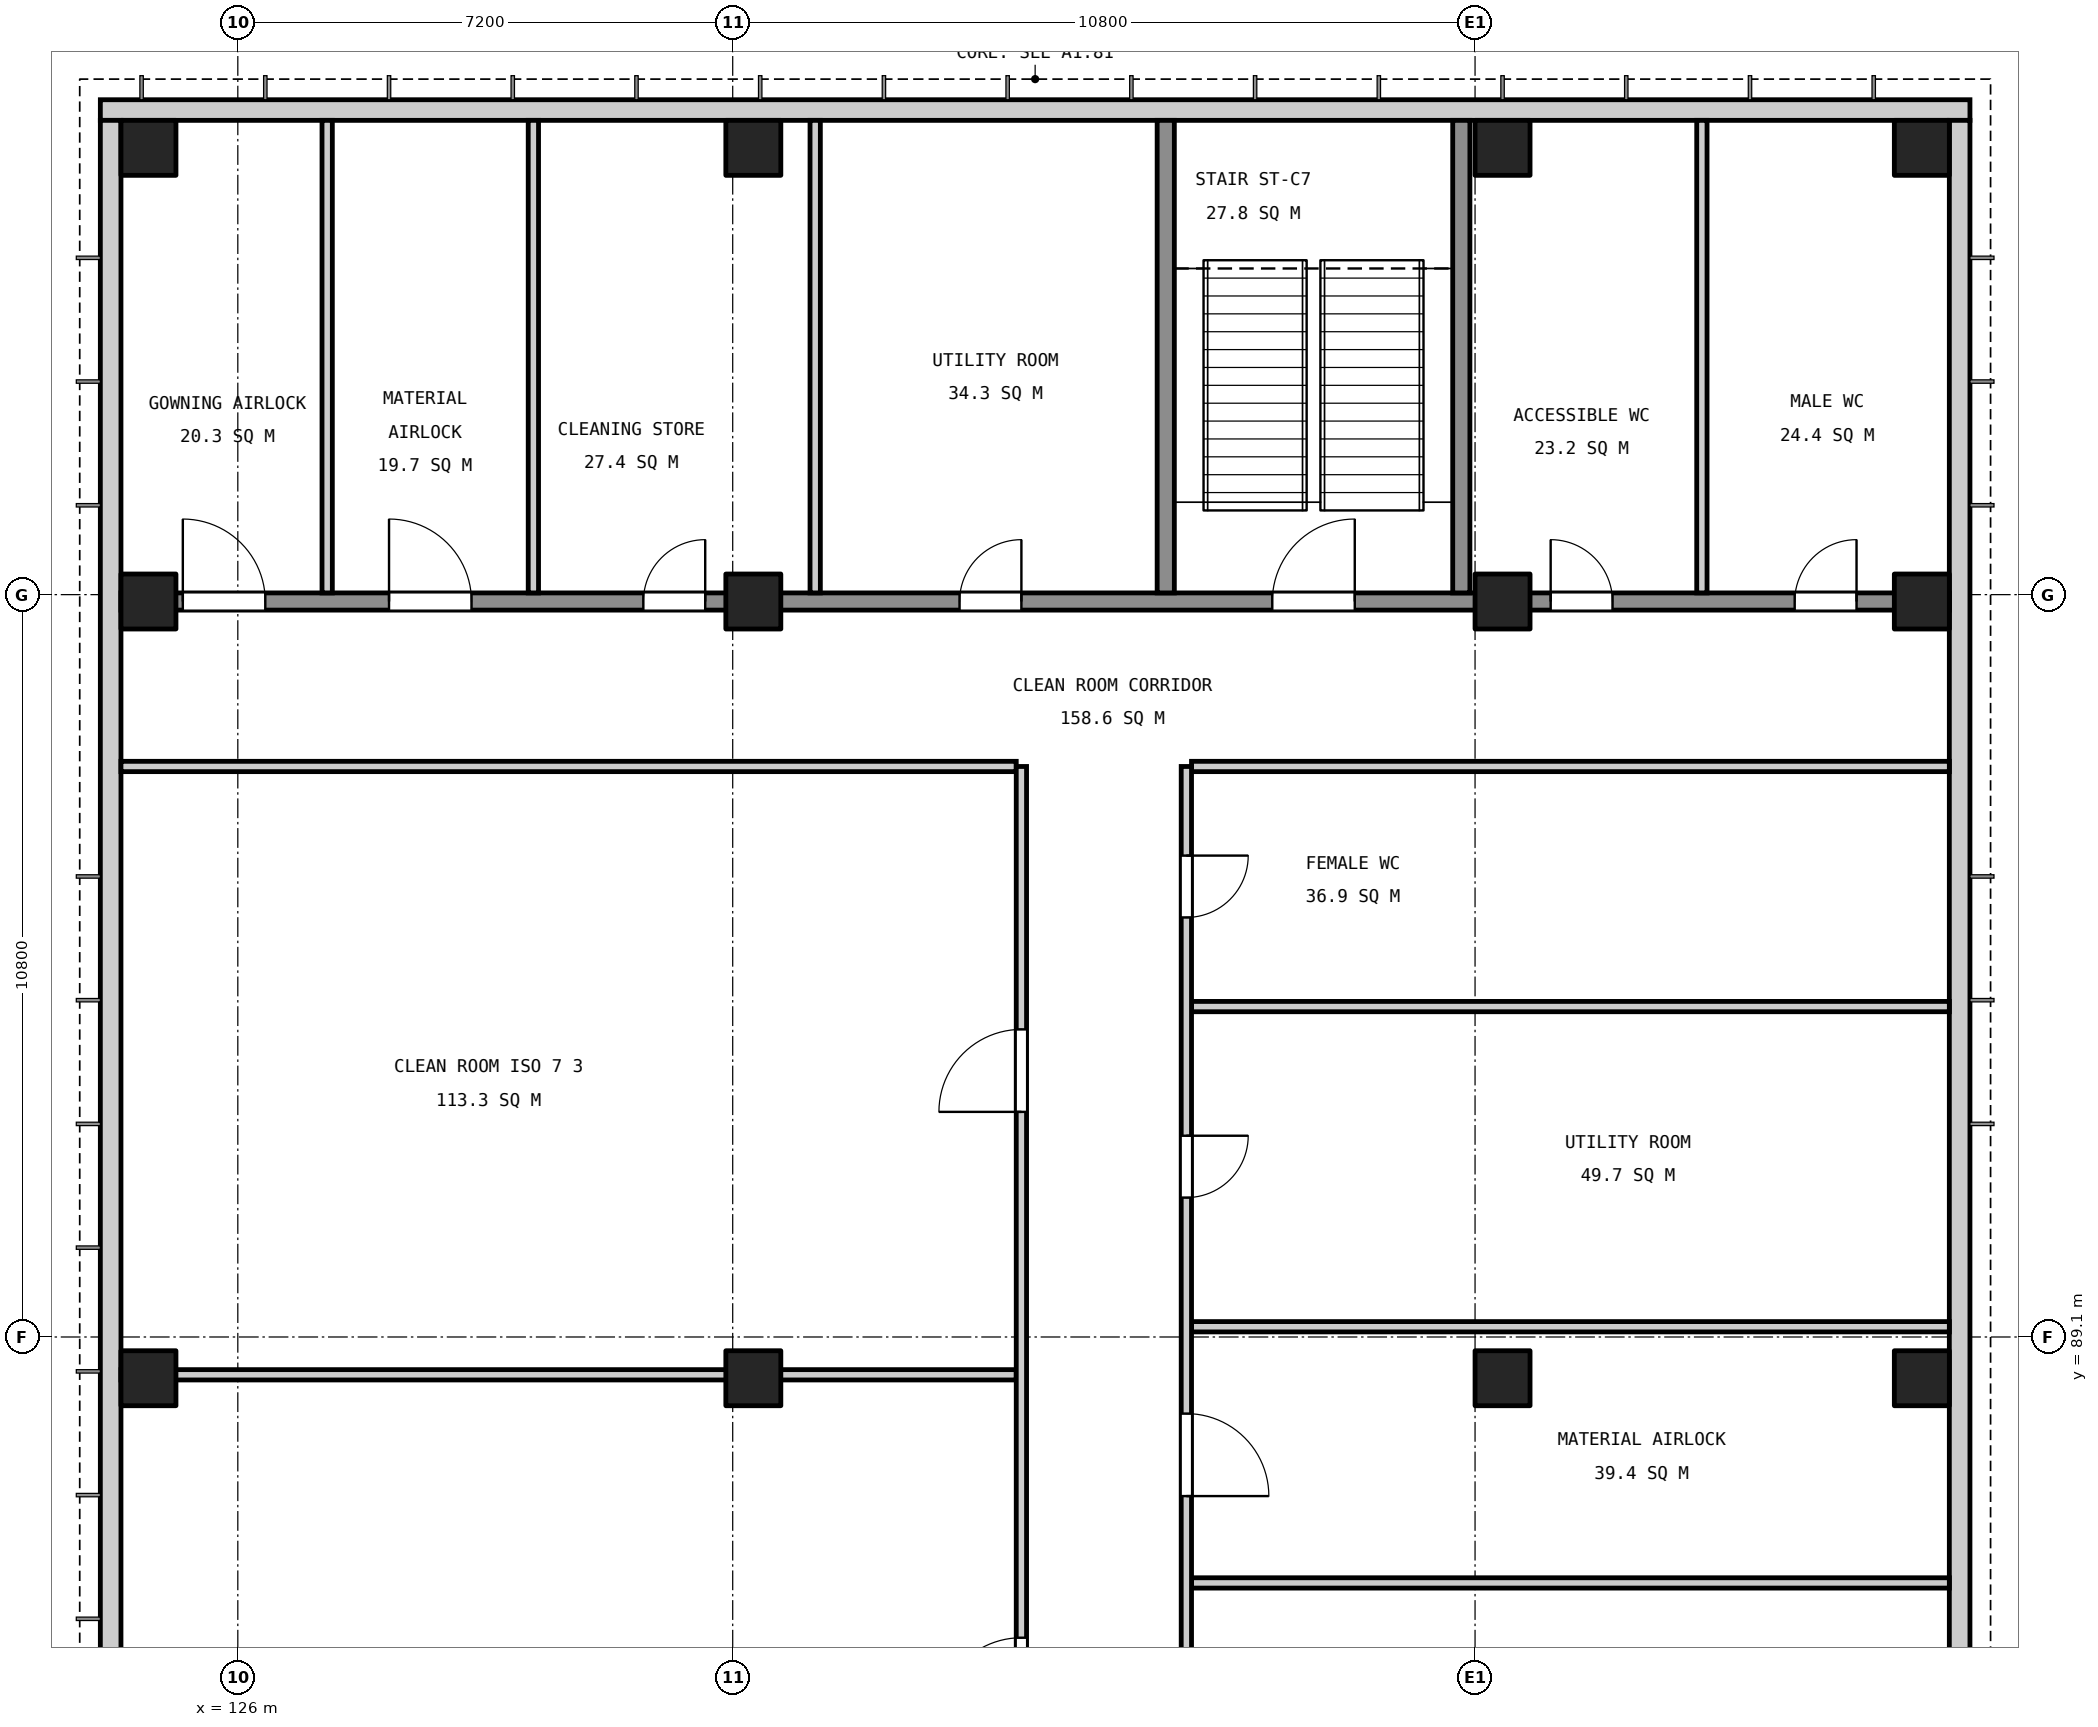
"""IFC4 building model, lengths in metres.
Left out: names, types, materials, properties, quantities, classifications, styles, units other than length and angle.
Written with IfcOpenShell. Run it as: python <this file> out.ifc"""

import sys

from ifc_helpers import new_model, si_unit, direction, frame, frame_2d, origin, origin_2d, place, context, subcontext, project, spatial, rectangle, extrude, element, fill, save


model = new_model("IFC4")
c1 = context("Model", 3, precision=1e-05, world=origin(), true_north=direction((0.0, 1.0)))
c2 = subcontext(c1, "Body", "Model", "MODEL_VIEW")
j1 = project(units=[si_unit("LENGTHUNIT", "METRE"), si_unit("PLANEANGLEUNIT", "RADIAN")], contexts=[c1])
p1 = place(None, origin())
s1 = spatial("IfcSite", under=j1, at=p1, CompositionType="ELEMENT")
p2 = place(p1, origin())
s2 = spatial("IfcBuilding", under=s1, at=p2, CompositionType="ELEMENT")
p3 = place(p2, frame((0.0, 0.0, 11.4)))
s3 = spatial("IfcBuildingStorey", under=s2, at=p3, CompositionType="ELEMENT", Elevation=11.4)
for number, where, z_axis, x_axis in (
    (1, (124.7, 88.5, 0.0), (0.0, 0.0, 1.0), (1.0, 0.0, 0.0)),
    (2, (124.7, 99.8, 0.0), (0.0, 0.0, 1.0), (1.0, 0.0, 0.0)),
    (3, (124.7, 106.4, 0.0), (0.0, 0.0, 1.0), (1.0, 0.0, 0.0)),
    (4, (133.5, 88.5, 0.0), (0.0, 0.0, 1.0), (1.0, 0.0, 0.0)),
    (5, (133.5, 99.8, 0.0), (0.0, 0.0, 1.0), (1.0, 0.0, 0.0)),
    (6, (133.5, 106.4, 0.0), (0.0, 0.0, 1.0), (1.0, 0.0, 0.0)),
    (7, (144.4, 88.5, 0.0), (0.0, 0.0, 1.0), (1.0, 0.0, 0.0)),
    (8, (144.4, 99.8, 0.0), (0.0, 0.0, 1.0), (1.0, 0.0, 0.0)),
    (9, (144.4, 106.4, 0.0), (0.0, 0.0, 1.0), (1.0, 0.0, 0.0)),
    (10, (150.5, 88.5, 0.0), (0.0, 0.0, 1.0), (1.0, 0.0, 0.0)),
    (11, (150.5, 99.8, 0.0), (0.0, 0.0, 1.0), (1.0, 0.0, 0.0)),
    (12, (150.5, 106.4, 0.0), (0.0, 0.0, 1.0), (1.0, 0.0, 0.0)),
):
    element("IfcColumn", number, at=place(p3, frame(where, z_axis=z_axis, x_axis=x_axis)), inside=s3, PredefinedType="COLUMN", context=c2, shape_type="SweptSolid", body=[
        extrude(rectangle(XDim=0.8, YDim=0.8, at=origin_2d()), origin(), (0.0, 0.0, 1.0), 5.4),
    ])
p4 = place(p3, frame((124.0, 106.95, 0.0), z_axis=(0.0, 0.0, 1.0), x_axis=(1.0, 0.0, 0.0)))
e13 = element("IfcWall", 13, at=p4, inside=s3, PredefinedType="SOLIDWALL", context=c2, shape_type="SweptSolid", body=[
    extrude(rectangle(XDim=27.2, YDim=0.3, at=frame_2d((13.6, 0.0))), origin(), (0.0, 0.0, 1.0), 4.95),
])
for number, where, z_axis, x_axis in (
    (14, (124.15, 70.3, 0.0), (0.0, 0.0, 1.0), (0.0, 1.0, 0.0)),
    (15, (151.05, 70.3, 0.0), (0.0, 0.0, 1.0), (0.0, 1.0, 0.0)),
):
    element("IfcWall", number, at=place(p3, frame(where, z_axis=z_axis, x_axis=x_axis)), inside=s3, PredefinedType="SOLIDWALL", context=c2, shape_type="SweptSolid", body=[
        extrude(rectangle(XDim=36.5, YDim=0.3, at=frame_2d((18.25, 0.0))), origin(), (0.0, 0.0, 1.0), 4.95),
    ])
p5 = place(p3, frame((139.875, 85.522, 0.0), z_axis=(0.0, 0.0, 1.0), x_axis=(1.0, 0.0, 0.0)))
e16 = element("IfcWall", 16, at=p5, inside=s3, PredefinedType="SOLIDWALL", context=c2, shape_type="SweptSolid", body=[
    extrude(rectangle(XDim=11.025, YDim=0.15, at=frame_2d((5.512, 0.0))), origin(), (0.0, 0.0, 1.0), 4.95),
])
p6 = place(p3, frame((124.3, 88.55, 0.0), z_axis=(0.0, 0.0, 1.0), x_axis=(1.0, 0.0, 0.0)))
e17 = element("IfcWall", 17, at=p6, inside=s3, PredefinedType="SOLIDWALL", context=c2, shape_type="SweptSolid", body=[
    extrude(rectangle(XDim=13.025, YDim=0.15, at=frame_2d((6.512, 0.0))), origin(), (0.0, 0.0, 1.0), 4.95),
])
for number, where, z_axis, x_axis in (
    (18, (139.875, 89.249, 0.0), (0.0, 0.0, 1.0), (1.0, 0.0, 0.0)),
    (19, (139.875, 93.907, 0.0), (0.0, 0.0, 1.0), (1.0, 0.0, 0.0)),
):
    element("IfcWall", number, at=place(p3, frame(where, z_axis=z_axis, x_axis=x_axis)), inside=s3, PredefinedType="SOLIDWALL", context=c2, shape_type="SweptSolid", body=[
        extrude(rectangle(XDim=11.025, YDim=0.15, at=frame_2d((5.512, 0.0))), origin(), (0.0, 0.0, 1.0), 4.95),
    ])
p7 = place(p3, frame((124.3, 97.4, 0.0), z_axis=(0.0, 0.0, 1.0), x_axis=(1.0, 0.0, 0.0)))
e20 = element("IfcWall", 20, at=p7, inside=s3, PredefinedType="SOLIDWALL", context=c2, shape_type="SweptSolid", body=[
    extrude(rectangle(XDim=13.025, YDim=0.15, at=frame_2d((6.512, 0.0))), origin(), (0.0, 0.0, 1.0), 4.95),
])
p8 = place(p3, frame((139.875, 97.4, 0.0), z_axis=(0.0, 0.0, 1.0), x_axis=(1.0, 0.0, 0.0)))
e21 = element("IfcWall", 21, at=p8, inside=s3, PredefinedType="SOLIDWALL", context=c2, shape_type="SweptSolid", body=[
    extrude(rectangle(XDim=11.025, YDim=0.15, at=frame_2d((5.512, 0.0))), origin(), (0.0, 0.0, 1.0), 4.95),
])
p9 = place(p3, frame((124.3, 99.8, 0.0), z_axis=(0.0, 0.0, 1.0), x_axis=(1.0, 0.0, 0.0)))
e22 = element("IfcWall", 22, at=p9, inside=s3, PredefinedType="SOLIDWALL", context=c2, shape_type="SweptSolid", body=[
    extrude(rectangle(XDim=26.6, YDim=0.25, at=frame_2d((13.3, 0.0))), origin(), (0.0, 0.0, 1.0), 4.95),
])
p10 = place(p9, frame((0.9, 0.0, 0.0)))
e23 = element("IfcOpeningElement", 23, at=p10, cuts=e22, PredefinedType="OPENING", context=c2, shape_type="SweptSolid", body=[
    extrude(rectangle(XDim=1.2, YDim=2.1, at=frame_2d((0.6, 1.05))), frame((0.0, 0.135, 0.0), z_axis=(0.0, -1.0, 0.0), x_axis=(1.0, 0.0, 0.0)), (0.0, 0.0, 1.0), 0.27),
])
p11 = place(p9, frame((3.9, 0.0, 0.0)))
e24 = element("IfcOpeningElement", 24, at=p11, cuts=e22, PredefinedType="OPENING", context=c2, shape_type="SweptSolid", body=[
    extrude(rectangle(XDim=1.2, YDim=2.1, at=frame_2d((0.6, 1.05))), frame((0.0, 0.135, 0.0), z_axis=(0.0, -1.0, 0.0), x_axis=(1.0, 0.0, 0.0)), (0.0, 0.0, 1.0), 0.27),
])
p12 = place(p9, frame((7.6, 0.0, 0.0)))
e25 = element("IfcOpeningElement", 25, at=p12, cuts=e22, PredefinedType="OPENING", context=c2, shape_type="SweptSolid", body=[
    extrude(rectangle(XDim=0.9, YDim=2.1, at=frame_2d((0.45, 1.05))), frame((0.0, 0.135, 0.0), z_axis=(0.0, -1.0, 0.0), x_axis=(1.0, 0.0, 0.0)), (0.0, 0.0, 1.0), 0.27),
])
p13 = place(p9, frame((20.8, 0.0, 0.0)))
e26 = element("IfcOpeningElement", 26, at=p13, cuts=e22, PredefinedType="OPENING", context=c2, shape_type="SweptSolid", body=[
    extrude(rectangle(XDim=0.9, YDim=2.1, at=frame_2d((0.45, 1.05))), frame((0.0, 0.135, 0.0), z_axis=(0.0, -1.0, 0.0), x_axis=(1.0, 0.0, 0.0)), (0.0, 0.0, 1.0), 0.27),
])
p14 = place(p9, frame((24.35, 0.0, 0.0)))
e27 = element("IfcOpeningElement", 27, at=p14, cuts=e22, PredefinedType="OPENING", context=c2, shape_type="SweptSolid", body=[
    extrude(rectangle(XDim=0.9, YDim=2.1, at=frame_2d((0.45, 1.05))), frame((0.0, 0.135, 0.0), z_axis=(0.0, -1.0, 0.0), x_axis=(1.0, 0.0, 0.0)), (0.0, 0.0, 1.0), 0.27),
])
p15 = place(p9, frame((12.2, 0.0, 0.0)))
e28 = element("IfcOpeningElement", 28, at=p15, cuts=e22, PredefinedType="OPENING", context=c2, shape_type="SweptSolid", body=[
    extrude(rectangle(XDim=0.9, YDim=2.1, at=frame_2d((0.45, 1.05))), frame((0.0, 0.135, 0.0), z_axis=(0.0, -1.0, 0.0), x_axis=(1.0, 0.0, 0.0)), (0.0, 0.0, 1.0), 0.27),
])
p16 = place(p9, frame((16.75, 0.0, 0.0)))
e29 = element("IfcOpeningElement", 29, at=p16, cuts=e22, PredefinedType="OPENING", context=c2, shape_type="SweptSolid", body=[
    extrude(rectangle(XDim=1.2, YDim=2.1, at=frame_2d((0.6, 1.05))), frame((0.0, 0.135, 0.0), z_axis=(0.0, -1.0, 0.0), x_axis=(1.0, 0.0, 0.0)), (0.0, 0.0, 1.0), 0.27),
])
for number, where, z_axis, x_axis in (
    (30, (127.3, 99.925, 0.0), (0.0, 0.0, 1.0), (0.0, 1.0, 0.0)),
    (31, (130.3, 99.925, 0.0), (0.0, 0.0, 1.0), (0.0, 1.0, 0.0)),
    (32, (134.4, 99.925, 0.0), (0.0, 0.0, 1.0), (0.0, 1.0, 0.0)),
):
    element("IfcWall", number, at=place(p3, frame(where, z_axis=z_axis, x_axis=x_axis)), inside=s3, PredefinedType="SOLIDWALL", context=c2, shape_type="SweptSolid", body=[
        extrude(rectangle(XDim=6.875, YDim=0.15, at=frame_2d((3.438, 0.0))), origin(), (0.0, 0.0, 1.0), 4.95),
    ])
p17 = place(p3, frame((137.4, 79.7, 0.0), z_axis=(0.0, 0.0, 1.0), x_axis=(0.0, 1.0, 0.0)))
e33 = element("IfcWall", 33, at=p17, inside=s3, PredefinedType="SOLIDWALL", context=c2, shape_type="SweptSolid", body=[
    extrude(rectangle(XDim=17.7, YDim=0.15, at=frame_2d((8.85, 0.0))), origin(), (0.0, 0.0, 1.0), 4.95),
])
p18 = place(p17, frame((3.825, 0.0, 0.0)))
e34 = element("IfcOpeningElement", 34, at=p18, cuts=e33, PredefinedType="OPENING", context=c2, shape_type="SweptSolid", body=[
    extrude(rectangle(XDim=1.2, YDim=2.1, at=frame_2d((0.6, 1.05))), frame((0.0, 0.085, 0.0), z_axis=(0.0, -1.0, 0.0), x_axis=(1.0, 0.0, 0.0)), (0.0, 0.0, 1.0), 0.17),
])
p19 = place(p17, frame((12.675, 0.0, 0.0)))
e35 = element("IfcOpeningElement", 35, at=p19, cuts=e33, PredefinedType="OPENING", context=c2, shape_type="SweptSolid", body=[
    extrude(rectangle(XDim=1.2, YDim=2.1, at=frame_2d((0.6, 1.05))), frame((0.0, 0.085, 0.0), z_axis=(0.0, -1.0, 0.0), x_axis=(1.0, 0.0, 0.0)), (0.0, 0.0, 1.0), 0.17),
])
p20 = place(p3, frame((139.5, 99.925, 0.0), z_axis=(0.0, 0.0, 1.0), x_axis=(0.0, 1.0, 0.0)))
e36 = element("IfcWall", 36, at=p20, inside=s3, PredefinedType="SOLIDWALL", context=c2, shape_type="SweptSolid", body=[
    extrude(rectangle(XDim=6.875, YDim=0.25, at=frame_2d((3.438, 0.0))), origin(), (0.0, 0.0, 1.0), 4.95),
])
p21 = place(p3, frame((139.8, 79.7, 0.0), z_axis=(0.0, 0.0, 1.0), x_axis=(0.0, 1.0, 0.0)))
e37 = element("IfcWall", 37, at=p21, inside=s3, PredefinedType="SOLIDWALL", context=c2, shape_type="SweptSolid", body=[
    extrude(rectangle(XDim=17.7, YDim=0.15, at=frame_2d((8.85, 0.0))), origin(), (0.0, 0.0, 1.0), 4.95),
])
p22 = place(p21, frame((2.311, 0.0, 0.0)))
e38 = element("IfcOpeningElement", 38, at=p22, cuts=e37, PredefinedType="OPENING", context=c2, shape_type="SweptSolid", body=[
    extrude(rectangle(XDim=1.2, YDim=2.1, at=frame_2d((0.6, 1.05))), frame((0.0, 0.085, 0.0), z_axis=(0.0, -1.0, 0.0), x_axis=(1.0, 0.0, 0.0)), (0.0, 0.0, 1.0), 0.17),
])
p23 = place(p21, frame((7.085, 0.0, 0.0)))
e39 = element("IfcOpeningElement", 39, at=p23, cuts=e37, PredefinedType="OPENING", context=c2, shape_type="SweptSolid", body=[
    extrude(rectangle(XDim=1.2, YDim=2.1, at=frame_2d((0.6, 1.05))), frame((0.0, 0.085, 0.0), z_axis=(0.0, -1.0, 0.0), x_axis=(1.0, 0.0, 0.0)), (0.0, 0.0, 1.0), 0.17),
])
p24 = place(p21, frame((11.428, 0.0, 0.0)))
e40 = element("IfcOpeningElement", 40, at=p24, cuts=e37, PredefinedType="OPENING", context=c2, shape_type="SweptSolid", body=[
    extrude(rectangle(XDim=0.9, YDim=2.1, at=frame_2d((0.45, 1.05))), frame((0.0, 0.085, 0.0), z_axis=(0.0, -1.0, 0.0), x_axis=(1.0, 0.0, 0.0)), (0.0, 0.0, 1.0), 0.17),
])
p25 = place(p21, frame((15.503, 0.0, 0.0)))
e41 = element("IfcOpeningElement", 41, at=p25, cuts=e37, PredefinedType="OPENING", context=c2, shape_type="SweptSolid", body=[
    extrude(rectangle(XDim=0.9, YDim=2.1, at=frame_2d((0.45, 1.05))), frame((0.0, 0.085, 0.0), z_axis=(0.0, -1.0, 0.0), x_axis=(1.0, 0.0, 0.0)), (0.0, 0.0, 1.0), 0.17),
])
p26 = place(p3, frame((143.8, 99.925, 0.0), z_axis=(0.0, 0.0, 1.0), x_axis=(0.0, 1.0, 0.0)))
e42 = element("IfcWall", 42, at=p26, inside=s3, PredefinedType="SOLIDWALL", context=c2, shape_type="SweptSolid", body=[
    extrude(rectangle(XDim=6.875, YDim=0.25, at=frame_2d((3.438, 0.0))), origin(), (0.0, 0.0, 1.0), 4.95),
])
p27 = place(p3, frame((147.3, 99.925, 0.0), z_axis=(0.0, 0.0, 1.0), x_axis=(0.0, 1.0, 0.0)))
e43 = element("IfcWall", 43, at=p27, inside=s3, PredefinedType="SOLIDWALL", context=c2, shape_type="SweptSolid", body=[
    extrude(rectangle(XDim=6.875, YDim=0.15, at=frame_2d((3.438, 0.0))), origin(), (0.0, 0.0, 1.0), 4.95),
])
p28 = place(p18, origin())
e44 = element("IfcDoor", 44, at=p28, inside=s3, OperationType="SINGLE_SWING_LEFT", PredefinedType="DOOR", context=c2, shape_type="SweptSolid", body=[
    extrude(rectangle(XDim=1.2, YDim=2.1, at=frame_2d((0.6, 1.05))), frame((0.0, 0.025, 0.0), z_axis=(0.0, -1.0, 0.0), x_axis=(1.0, 0.0, 0.0)), (0.0, 0.0, 1.0), 0.05),
])
fill(e34, e44)
p29 = place(p19, origin())
e45 = element("IfcDoor", 45, at=p29, inside=s3, OperationType="SINGLE_SWING_LEFT", PredefinedType="DOOR", context=c2, shape_type="SweptSolid", body=[
    extrude(rectangle(XDim=1.2, YDim=2.1, at=frame_2d((0.6, 1.05))), frame((0.0, 0.025, 0.0), z_axis=(0.0, -1.0, 0.0), x_axis=(1.0, 0.0, 0.0)), (0.0, 0.0, 1.0), 0.05),
])
fill(e35, e45)
p30 = place(p23, frame((1.2, 0.0, 0.0), z_axis=(0.0, 0.0, 1.0), x_axis=(-1.0, 0.0, 0.0)))
e46 = element("IfcDoor", 46, at=p30, inside=s3, OperationType="SINGLE_SWING_RIGHT", PredefinedType="DOOR", context=c2, shape_type="SweptSolid", body=[
    extrude(rectangle(XDim=1.2, YDim=2.1, at=frame_2d((0.6, 1.05))), frame((0.0, 0.025, 0.0), z_axis=(0.0, -1.0, 0.0), x_axis=(1.0, 0.0, 0.0)), (0.0, 0.0, 1.0), 0.05),
])
fill(e39, e46)
p31 = place(p24, frame((0.9, 0.0, 0.0), z_axis=(0.0, 0.0, 1.0), x_axis=(-1.0, 0.0, 0.0)))
e47 = element("IfcDoor", 47, at=p31, inside=s3, OperationType="SINGLE_SWING_LEFT", PredefinedType="DOOR", context=c2, shape_type="SweptSolid", body=[
    extrude(rectangle(XDim=0.9, YDim=2.1, at=frame_2d((0.45, 1.05))), frame((0.0, 0.025, 0.0), z_axis=(0.0, -1.0, 0.0), x_axis=(1.0, 0.0, 0.0)), (0.0, 0.0, 1.0), 0.05),
])
fill(e40, e47)
p32 = place(p25, frame((0.9, 0.0, 0.0), z_axis=(0.0, 0.0, 1.0), x_axis=(-1.0, 0.0, 0.0)))
e48 = element("IfcDoor", 48, at=p32, inside=s3, OperationType="SINGLE_SWING_LEFT", PredefinedType="DOOR", context=c2, shape_type="SweptSolid", body=[
    extrude(rectangle(XDim=0.9, YDim=2.1, at=frame_2d((0.45, 1.05))), frame((0.0, 0.025, 0.0), z_axis=(0.0, -1.0, 0.0), x_axis=(1.0, 0.0, 0.0)), (0.0, 0.0, 1.0), 0.05),
])
fill(e41, e48)
p33 = place(p10, origin())
e49 = element("IfcDoor", 49, at=p33, inside=s3, OperationType="SINGLE_SWING_LEFT", PredefinedType="DOOR", context=c2, shape_type="SweptSolid", body=[
    extrude(rectangle(XDim=1.2, YDim=2.1, at=frame_2d((0.6, 1.05))), frame((0.0, 0.025, 0.0), z_axis=(0.0, -1.0, 0.0), x_axis=(1.0, 0.0, 0.0)), (0.0, 0.0, 1.0), 0.05),
])
fill(e23, e49)
p34 = place(p11, origin())
e50 = element("IfcDoor", 50, at=p34, inside=s3, OperationType="SINGLE_SWING_LEFT", PredefinedType="DOOR", context=c2, shape_type="SweptSolid", body=[
    extrude(rectangle(XDim=1.2, YDim=2.1, at=frame_2d((0.6, 1.05))), frame((0.0, 0.025, 0.0), z_axis=(0.0, -1.0, 0.0), x_axis=(1.0, 0.0, 0.0)), (0.0, 0.0, 1.0), 0.05),
])
fill(e24, e50)
p35 = place(p12, origin())
e51 = element("IfcDoor", 51, at=p35, inside=s3, OperationType="SINGLE_SWING_RIGHT", PredefinedType="DOOR", context=c2, shape_type="SweptSolid", body=[
    extrude(rectangle(XDim=0.9, YDim=2.1, at=frame_2d((0.45, 1.05))), frame((0.0, 0.025, 0.0), z_axis=(0.0, -1.0, 0.0), x_axis=(1.0, 0.0, 0.0)), (0.0, 0.0, 1.0), 0.05),
])
fill(e25, e51)
p36 = place(p13, origin())
e52 = element("IfcDoor", 52, at=p36, inside=s3, OperationType="SINGLE_SWING_LEFT", PredefinedType="DOOR", context=c2, shape_type="SweptSolid", body=[
    extrude(rectangle(XDim=0.9, YDim=2.1, at=frame_2d((0.45, 1.05))), frame((0.0, 0.025, 0.0), z_axis=(0.0, -1.0, 0.0), x_axis=(1.0, 0.0, 0.0)), (0.0, 0.0, 1.0), 0.05),
])
fill(e26, e52)
p37 = place(p14, origin())
e53 = element("IfcDoor", 53, at=p37, inside=s3, OperationType="SINGLE_SWING_RIGHT", PredefinedType="DOOR", context=c2, shape_type="SweptSolid", body=[
    extrude(rectangle(XDim=0.9, YDim=2.1, at=frame_2d((0.45, 1.05))), frame((0.0, 0.025, 0.0), z_axis=(0.0, -1.0, 0.0), x_axis=(1.0, 0.0, 0.0)), (0.0, 0.0, 1.0), 0.05),
])
fill(e27, e53)
p38 = place(p15, origin())
e54 = element("IfcDoor", 54, at=p38, inside=s3, OperationType="SINGLE_SWING_RIGHT", PredefinedType="DOOR", context=c2, shape_type="SweptSolid", body=[
    extrude(rectangle(XDim=0.9, YDim=2.1, at=frame_2d((0.45, 1.05))), frame((0.0, 0.025, 0.0), z_axis=(0.0, -1.0, 0.0), x_axis=(1.0, 0.0, 0.0)), (0.0, 0.0, 1.0), 0.05),
])
fill(e28, e54)
p39 = place(p16, origin())
e55 = element("IfcDoor", 55, at=p39, inside=s3, OperationType="SINGLE_SWING_RIGHT", PredefinedType="DOOR", context=c2, shape_type="SweptSolid", body=[
    extrude(rectangle(XDim=1.2, YDim=2.1, at=frame_2d((0.6, 1.05))), frame((0.0, 0.025, 0.0), z_axis=(0.0, -1.0, 0.0), x_axis=(1.0, 0.0, 0.0)), (0.0, 0.0, 1.0), 0.05),
])
fill(e29, e55)
save(model, sys.argv[1])
